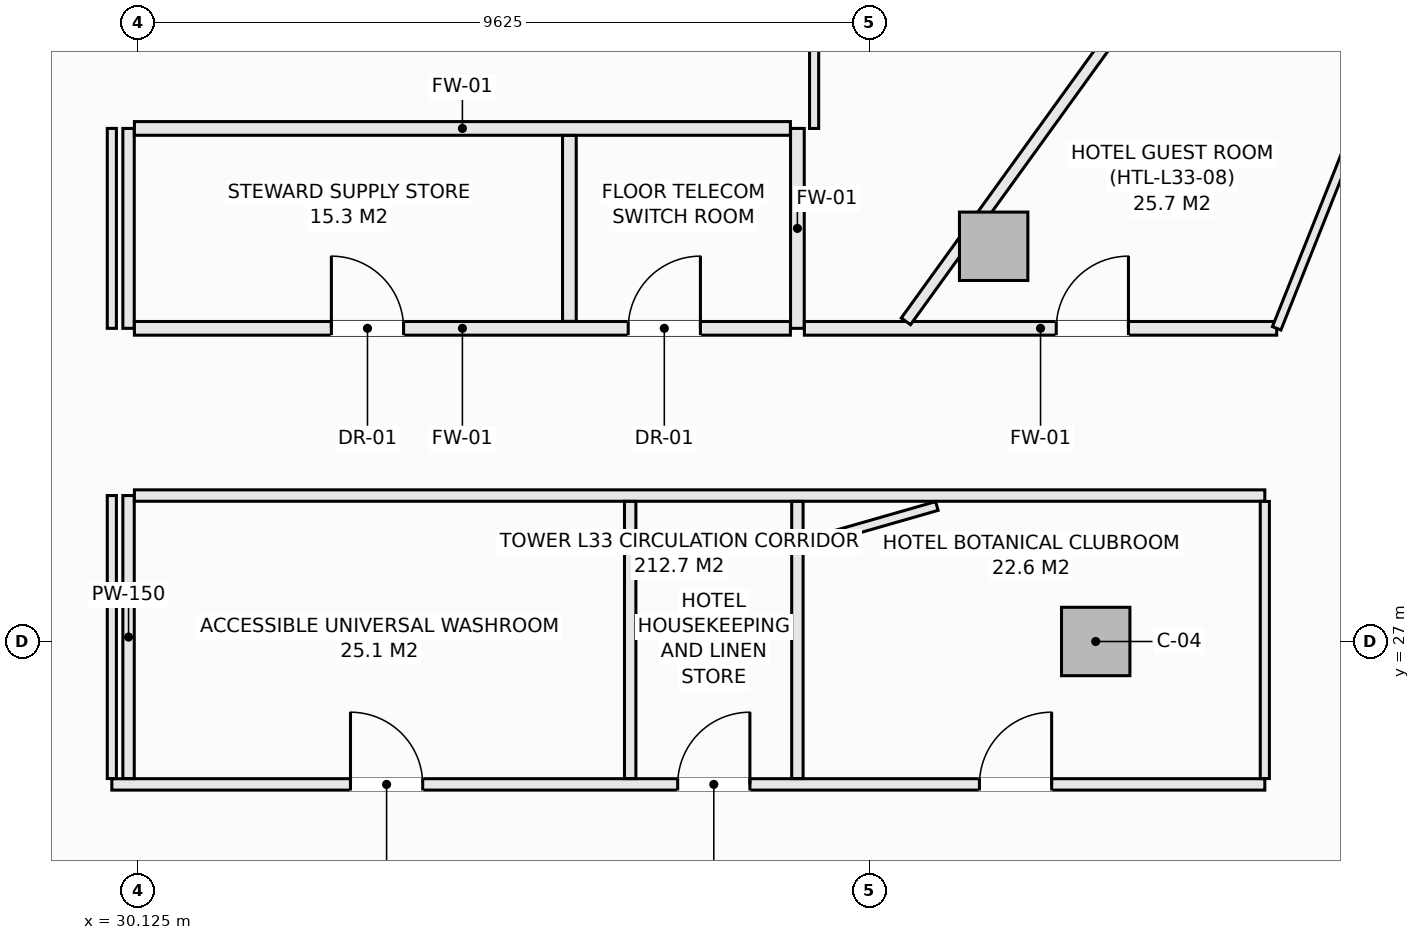
"""IFC4 building model, lengths in metres.
Left out: names, types, materials, properties, quantities, classifications, styles, units other than length and angle.
Written with IfcOpenShell. Run it as: python <this file> out.ifc"""

import sys

from ifc_helpers import new_model, si_unit, direction, frame, frame_2d, origin, origin_2d, place, context, subcontext, project, spatial, rectangle, extrude, element, fill, save


model = new_model("IFC4")
c1 = context("Model", 3, precision=1e-05, world=origin(), true_north=direction((0.0, 1.0)))
c2 = subcontext(c1, "Body", "Model", "MODEL_VIEW")
j1 = project(units=[si_unit("LENGTHUNIT", "METRE"), si_unit("PLANEANGLEUNIT", "RADIAN")], contexts=[c1])
p1 = place(None, origin())
s1 = spatial("IfcSite", under=j1, at=p1, CompositionType="ELEMENT")
p2 = place(p1, origin())
s2 = spatial("IfcBuilding", under=s1, at=p2, CompositionType="ELEMENT")
p3 = place(p2, frame((0.0, 0.0, 132.5)))
s3 = spatial("IfcBuildingStorey", under=s2, at=p3, CompositionType="ELEMENT", Elevation=132.5)
for number, where, z_axis, x_axis in (
    (1, (42.725, 27.0, -0.27), (0.0, 0.0, 1.0), (1.0, 0.0, 0.0)),
    (2, (41.382, 32.199, -0.27), (0.0, 0.0, 1.0), (1.0, 0.0, 0.0)),
):
    element("IfcColumn", number, at=place(p3, frame(where, z_axis=z_axis, x_axis=x_axis)), inside=s3, PredefinedType="COLUMN", context=c2, shape_type="SweptSolid", body=[
        extrude(rectangle(XDim=0.9, YDim=0.9, at=origin_2d()), origin(), (0.0, 0.0, 1.0), 3.4),
    ])
p4 = place(p3, frame((29.78, 25.12, 0.0), z_axis=(0.0, 0.0, 1.0), x_axis=(1.0, 0.0, 0.0)))
e3 = element("IfcWall", 3, at=p4, inside=s3, PredefinedType="PARTITIONING", context=c2, shape_type="SweptSolid", body=[
    extrude(rectangle(XDim=15.17, YDim=0.15, at=frame_2d((7.585, 0.0))), origin(), (0.0, 0.0, 1.0), 3.13),
])
p5 = place(p4, frame((3.14, 0.0, 0.0)))
e4 = element("IfcOpeningElement", 4, at=p5, cuts=e3, PredefinedType="OPENING", context=c2, shape_type="SweptSolid", body=[
    extrude(rectangle(XDim=0.95, YDim=2.1, at=frame_2d((0.475, 1.05))), frame((0.0, 0.085, 0.0), z_axis=(0.0, -1.0, 0.0), x_axis=(1.0, 0.0, 0.0)), (0.0, 0.0, 1.0), 0.17),
])
p6 = place(p4, frame((7.445, 0.0, 0.0)))
e5 = element("IfcOpeningElement", 5, at=p6, cuts=e3, PredefinedType="OPENING", context=c2, shape_type="SweptSolid", body=[
    extrude(rectangle(XDim=0.95, YDim=2.1, at=frame_2d((0.475, 1.05))), frame((0.0, 0.085, 0.0), z_axis=(0.0, -1.0, 0.0), x_axis=(1.0, 0.0, 0.0)), (0.0, 0.0, 1.0), 0.17),
])
p7 = place(p4, frame((11.415, 0.0, 0.0)))
e6 = element("IfcOpeningElement", 6, at=p7, cuts=e3, PredefinedType="OPENING", context=c2, shape_type="SweptSolid", body=[
    extrude(rectangle(XDim=0.95, YDim=2.1, at=frame_2d((0.475, 1.05))), frame((0.0, 0.085, 0.0), z_axis=(0.0, -1.0, 0.0), x_axis=(1.0, 0.0, 0.0)), (0.0, 0.0, 1.0), 0.17),
])
p8 = place(p3, frame((30.0, 25.197, 0.0), z_axis=(0.0, 0.0, 1.0), x_axis=(0.0, 1.0, 0.0)))
e7 = element("IfcWall", 7, at=p8, inside=s3, PredefinedType="PARTITIONING", context=c2, shape_type="SweptSolid", body=[
    extrude(rectangle(XDim=3.723, YDim=0.15, at=frame_2d((1.861, 0.0))), origin(), (0.0, 0.0, 1.0), 3.13),
])
p9 = place(p3, frame((30.0, 31.12, 0.0), z_axis=(0.0, 0.0, 1.0), x_axis=(0.0, 1.0, 0.0)))
e8 = element("IfcWall", 8, at=p9, inside=s3, PredefinedType="PARTITIONING", context=c2, shape_type="SweptSolid", body=[
    extrude(rectangle(XDim=2.63, YDim=0.15, at=frame_2d((1.315, 0.0))), origin(), (0.0, 0.0, 1.0), 3.13),
])
p10 = place(p3, frame((30.077, 28.92, 0.0), z_axis=(0.0, 0.0, 1.0), x_axis=(1.0, 0.0, 0.0)))
e9 = element("IfcWall", 9, at=p10, inside=s3, PredefinedType="PARTITIONING", context=c2, shape_type="SweptSolid", body=[
    extrude(rectangle(XDim=14.873, YDim=0.15, at=frame_2d((7.437, 0.0))), origin(), (0.0, 0.0, 1.0), 3.13),
])
for number, where, z_axis, x_axis in (
    (10, (36.6, 25.197, 0.0), (0.0, 0.0, 1.0), (0.0, 1.0, 0.0)),
    (11, (38.8, 25.197, 0.0), (0.0, 0.0, 1.0), (0.0, 1.0, 0.0)),
):
    element("IfcWall", number, at=place(p3, frame(where, z_axis=z_axis, x_axis=x_axis)), inside=s3, PredefinedType="PARTITIONING", context=c2, shape_type="SweptSolid", body=[
        extrude(rectangle(XDim=3.646, YDim=0.15, at=frame_2d((1.823, 0.0))), origin(), (0.0, 0.0, 1.0), 3.13),
    ])
p11 = place(p3, frame((38.8, 31.12, 0.0), z_axis=(0.0, 0.0, 1.0), x_axis=(0.0, 1.0, 0.0)))
e12 = element("IfcWall", 12, at=p11, inside=s3, PredefinedType="SOLIDWALL", context=c2, shape_type="SweptSolid", body=[
    extrude(rectangle(XDim=2.63, YDim=0.18, at=frame_2d((1.315, 0.0))), origin(), (0.0, 0.0, 1.0), 3.13),
])
p12 = place(p3, frame((30.077, 31.12, 0.0), z_axis=(0.0, 0.0, 1.0), x_axis=(1.0, 0.0, 0.0)))
e13 = element("IfcWall", 13, at=p12, inside=s3, PredefinedType="SOLIDWALL", context=c2, shape_type="SweptSolid", body=[
    extrude(rectangle(XDim=8.631, YDim=0.18, at=frame_2d((4.315, 0.0))), origin(), (0.0, 0.0, 1.0), 3.13),
])
p13 = place(p12, frame((2.592, 0.0, 0.0)))
e14 = element("IfcOpeningElement", 14, at=p13, cuts=e13, PredefinedType="OPENING", context=c2, shape_type="SweptSolid", body=[
    extrude(rectangle(XDim=0.95, YDim=2.1, at=frame_2d((0.475, 1.05))), frame((0.0, 0.1, 0.0), z_axis=(0.0, -1.0, 0.0), x_axis=(1.0, 0.0, 0.0)), (0.0, 0.0, 1.0), 0.2),
])
p14 = place(p12, frame((6.497, 0.0, 0.0)))
e15 = element("IfcOpeningElement", 15, at=p14, cuts=e13, PredefinedType="OPENING", context=c2, shape_type="SweptSolid", body=[
    extrude(rectangle(XDim=0.95, YDim=2.1, at=frame_2d((0.475, 1.05))), frame((0.0, 0.1, 0.0), z_axis=(0.0, -1.0, 0.0), x_axis=(1.0, 0.0, 0.0)), (0.0, 0.0, 1.0), 0.2),
])
p15 = place(p3, frame((38.892, 31.12, 0.0), z_axis=(0.0, 0.0, 1.0), x_axis=(1.0, 0.0, 0.0)))
e16 = element("IfcWall", 16, at=p15, inside=s3, PredefinedType="SOLIDWALL", context=c2, shape_type="SweptSolid", body=[
    extrude(rectangle(XDim=6.214, YDim=0.18, at=frame_2d((3.107, 0.0))), origin(), (0.0, 0.0, 1.0), 3.13),
])
p16 = place(p15, frame((3.313, 0.0, 0.0)))
e17 = element("IfcOpeningElement", 17, at=p16, cuts=e16, PredefinedType="OPENING", context=c2, shape_type="SweptSolid", body=[
    extrude(rectangle(XDim=0.95, YDim=2.1, at=frame_2d((0.475, 1.05))), frame((0.0, 0.1, 0.0), z_axis=(0.0, -1.0, 0.0), x_axis=(1.0, 0.0, 0.0)), (0.0, 0.0, 1.0), 0.2),
])
p17 = place(p3, frame((30.077, 33.75, 0.0), z_axis=(0.0, 0.0, 1.0), x_axis=(1.0, 0.0, 0.0)))
e18 = element("IfcWall", 18, at=p17, inside=s3, PredefinedType="SOLIDWALL", context=c2, shape_type="SweptSolid", body=[
    extrude(rectangle(XDim=8.631, YDim=0.18, at=frame_2d((4.315, 0.0))), origin(), (0.0, 0.0, 1.0), 3.13),
])
p18 = place(p3, frame((35.8, 31.212, 0.0), z_axis=(0.0, 0.0, 1.0), x_axis=(0.0, 1.0, 0.0)))
e19 = element("IfcWall", 19, at=p18, inside=s3, PredefinedType="SOLIDWALL", context=c2, shape_type="SweptSolid", body=[
    extrude(rectangle(XDim=2.446, YDim=0.18, at=frame_2d((1.223, 0.0))), origin(), (0.0, 0.0, 1.0), 3.13),
])
p19 = place(p3, frame((39.02, 33.75, 0.0), z_axis=(0.0, 0.0, 1.0), x_axis=(0.0, 1.0, 0.0)))
e20 = element("IfcWall", 20, at=p19, inside=s3, PredefinedType="PARTITIONING", context=c2, shape_type="SweptSolid", body=[
    extrude(rectangle(XDim=2.0, YDim=0.12, at=frame_2d((1.0, 0.0))), origin(), (0.0, 0.0, 1.0), 3.13),
])
p20 = place(p3, frame((29.78, 25.197, 0.0), z_axis=(0.0, 0.0, 1.0), x_axis=(0.0, 1.0, 0.0)))
e21 = element("IfcWall", 21, at=p20, inside=s3, PredefinedType="PARTITIONING", context=c2, shape_type="SweptSolid", body=[
    extrude(rectangle(XDim=3.723, YDim=0.12, at=frame_2d((1.861, 0.0))), origin(), (0.0, 0.0, 1.0), 3.13),
])
p21 = place(p3, frame((29.78, 31.12, 0.0), z_axis=(0.0, 0.0, 1.0), x_axis=(0.0, 1.0, 0.0)))
e22 = element("IfcWall", 22, at=p21, inside=s3, PredefinedType="PARTITIONING", context=c2, shape_type="SweptSolid", body=[
    extrude(rectangle(XDim=2.63, YDim=0.12, at=frame_2d((1.315, 0.0))), origin(), (0.0, 0.0, 1.0), 3.13),
])
p22 = place(p3, frame((45.106, 31.12, 0.0), z_axis=(0.0, 0.0, 1.0), x_axis=(0.370123465787, 0.928982572535, 0.0)))
e23 = element("IfcWall", 23, at=p22, inside=s3, PredefinedType="PARTITIONING", context=c2, shape_type="SweptSolid", body=[
    extrude(rectangle(XDim=4.02, YDim=0.12, at=frame_2d((2.01, 0.0))), origin(), (0.0, 0.0, 1.0), 3.13),
])
p23 = place(p3, frame((44.95, 25.197, 0.0), z_axis=(0.0, 0.0, 1.0), x_axis=(0.0, 1.0, 0.0)))
e24 = element("IfcWall", 24, at=p23, inside=s3, PredefinedType="PARTITIONING", context=c2, shape_type="SweptSolid", body=[
    extrude(rectangle(XDim=3.646, YDim=0.12, at=frame_2d((1.823, 0.0))), origin(), (0.0, 0.0, 1.0), 3.13),
])
p24 = place(p3, frame((38.877, 28.279, 0.0), z_axis=(0.0, 0.0, 1.0), x_axis=(0.96129187977, 0.275532070524, 0.0)))
e25 = element("IfcWall", 25, at=p24, inside=s3, PredefinedType="PARTITIONING", context=c2, shape_type="SweptSolid", body=[
    extrude(rectangle(XDim=1.829, YDim=0.12, at=frame_2d((0.915, 0.0))), origin(), (0.0, 0.0, 1.0), 3.13),
])
p25 = place(p3, frame((40.227, 31.212, 0.0), z_axis=(0.0, 0.0, 1.0), x_axis=(0.58530522165, 0.8108130472, 0.0)))
e26 = element("IfcWall", 26, at=p25, inside=s3, PredefinedType="PARTITIONING", context=c2, shape_type="SweptSolid", body=[
    extrude(rectangle(XDim=6.83, YDim=0.15, at=frame_2d((3.415, 0.0))), origin(), (0.0, 0.0, 1.0), 3.13),
])
p26 = place(p5, origin())
e27 = element("IfcDoor", 27, at=p26, inside=s3, OperationType="SINGLE_SWING_LEFT", PredefinedType="DOOR", context=c2, shape_type="SweptSolid", body=[
    extrude(rectangle(XDim=0.95, YDim=2.1, at=frame_2d((0.475, 1.05))), frame((0.0, 0.025, 0.0), z_axis=(0.0, -1.0, 0.0), x_axis=(1.0, 0.0, 0.0)), (0.0, 0.0, 1.0), 0.05),
])
fill(e4, e27)
p27 = place(p6, origin())
e28 = element("IfcDoor", 28, at=p27, inside=s3, OperationType="SINGLE_SWING_RIGHT", PredefinedType="DOOR", context=c2, shape_type="SweptSolid", body=[
    extrude(rectangle(XDim=0.95, YDim=2.1, at=frame_2d((0.475, 1.05))), frame((0.0, 0.025, 0.0), z_axis=(0.0, -1.0, 0.0), x_axis=(1.0, 0.0, 0.0)), (0.0, 0.0, 1.0), 0.05),
])
fill(e5, e28)
p28 = place(p13, origin())
e29 = element("IfcDoor", 29, at=p28, inside=s3, OperationType="SINGLE_SWING_LEFT", PredefinedType="DOOR", context=c2, shape_type="SweptSolid", body=[
    extrude(rectangle(XDim=0.95, YDim=2.1, at=frame_2d((0.475, 1.05))), frame((0.0, 0.025, 0.0), z_axis=(0.0, -1.0, 0.0), x_axis=(1.0, 0.0, 0.0)), (0.0, 0.0, 1.0), 0.05),
])
fill(e14, e29)
p29 = place(p14, origin())
e30 = element("IfcDoor", 30, at=p29, inside=s3, OperationType="SINGLE_SWING_RIGHT", PredefinedType="DOOR", context=c2, shape_type="SweptSolid", body=[
    extrude(rectangle(XDim=0.95, YDim=2.1, at=frame_2d((0.475, 1.05))), frame((0.0, 0.025, 0.0), z_axis=(0.0, -1.0, 0.0), x_axis=(1.0, 0.0, 0.0)), (0.0, 0.0, 1.0), 0.05),
])
fill(e15, e30)
p30 = place(p7, origin())
e31 = element("IfcDoor", 31, at=p30, inside=s3, OperationType="SINGLE_SWING_RIGHT", PredefinedType="DOOR", context=c2, shape_type="SweptSolid", body=[
    extrude(rectangle(XDim=0.95, YDim=2.1, at=frame_2d((0.475, 1.05))), frame((0.0, 0.025, 0.0), z_axis=(0.0, -1.0, 0.0), x_axis=(1.0, 0.0, 0.0)), (0.0, 0.0, 1.0), 0.05),
])
fill(e6, e31)
p31 = place(p16, origin())
e32 = element("IfcDoor", 32, at=p31, inside=s3, OperationType="SINGLE_SWING_RIGHT", PredefinedType="DOOR", context=c2, shape_type="SweptSolid", body=[
    extrude(rectangle(XDim=0.95, YDim=2.1, at=frame_2d((0.475, 1.05))), frame((0.0, 0.025, 0.0), z_axis=(0.0, -1.0, 0.0), x_axis=(1.0, 0.0, 0.0)), (0.0, 0.0, 1.0), 0.05),
])
fill(e17, e32)
save(model, sys.argv[1])
